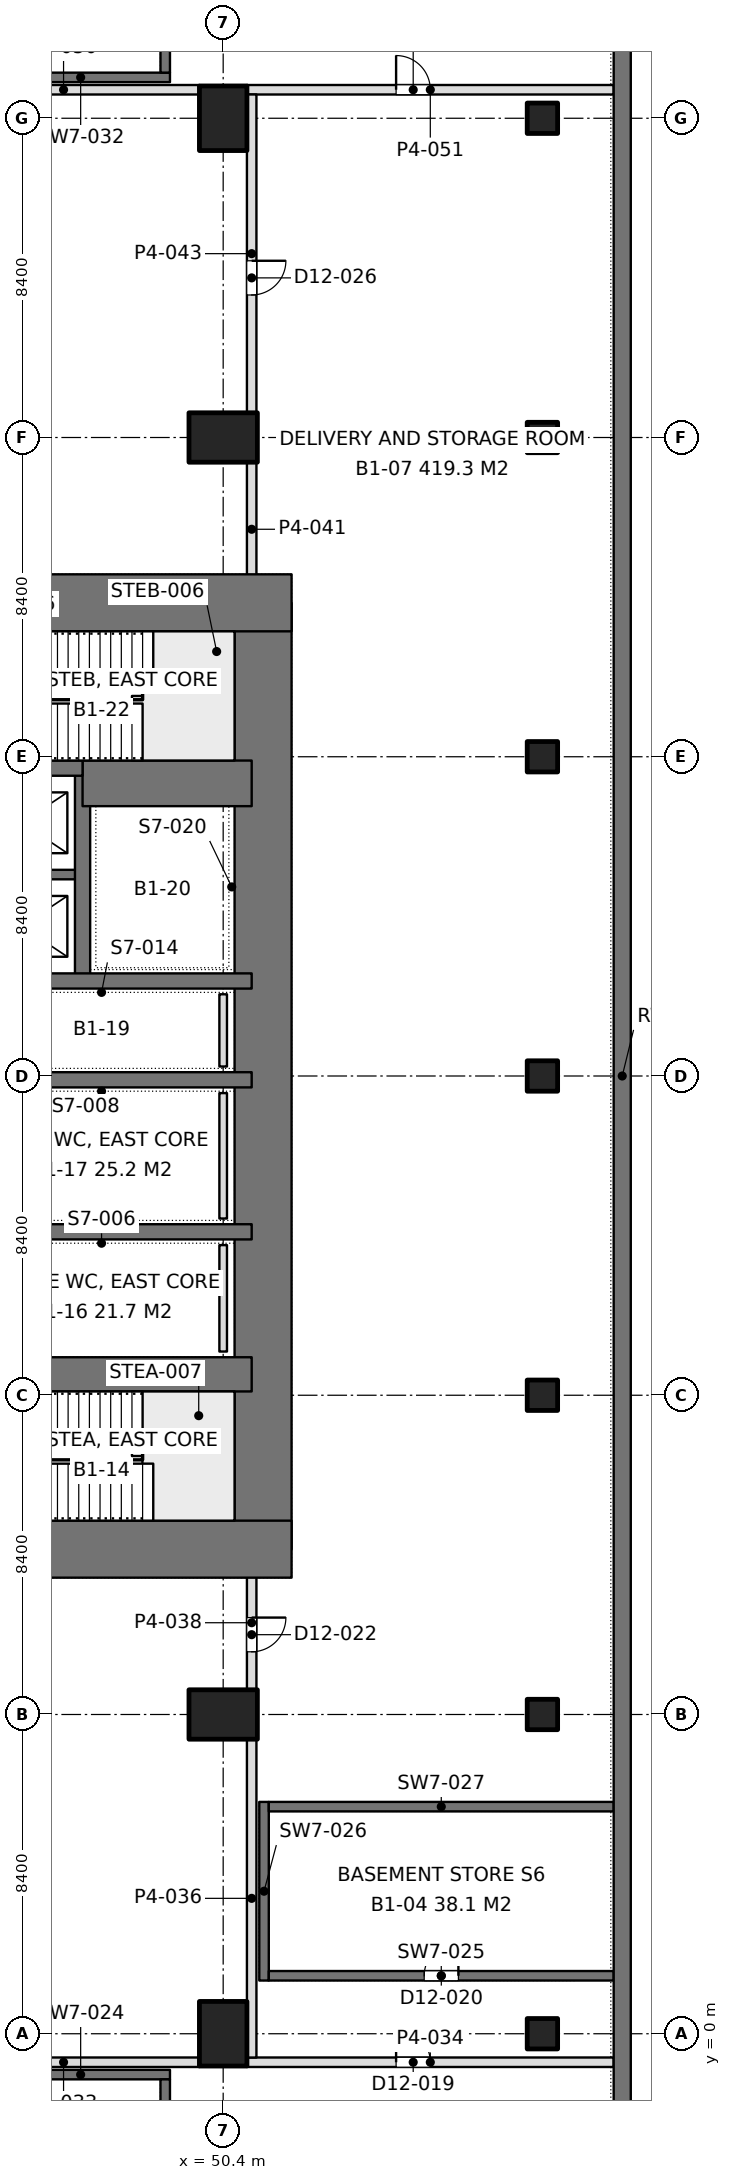
"""IFC4 building model, lengths in metres.
Left out: names, types, materials, properties, quantities, classifications, styles, units other than length and angle.
Written with IfcOpenShell. Run it as: python <this file> out.ifc"""

import sys

from ifc_helpers import new_model, si_unit, direction, frame, frame_2d, origin, origin_2d, place, context, subcontext, project, spatial, rectangle, extrude, element, fill, save


model = new_model("IFC4")
c1 = context("Model", 3, precision=1e-05, world=origin(), true_north=direction((0.0, 1.0)))
c2 = subcontext(c1, "Body", "Model", "MODEL_VIEW")
j1 = project(units=[si_unit("LENGTHUNIT", "METRE"), si_unit("PLANEANGLEUNIT", "RADIAN")], contexts=[c1])
p1 = place(None, origin())
s1 = spatial("IfcSite", under=j1, at=p1, CompositionType="ELEMENT")
p2 = place(p1, origin())
s2 = spatial("IfcBuilding", under=s1, at=p2, CompositionType="ELEMENT")
p3 = place(p2, frame((0.0, 0.0, -4.2)))
s3 = spatial("IfcBuildingStorey", under=s2, at=p3, CompositionType="ELEMENT", Elevation=-4.2)
p4 = place(p3, frame((60.9, -10.5, 0.0), z_axis=(0.0, 0.0, 1.0), x_axis=(0.0, 1.0, 0.0)))
e1 = element("IfcWall", 1, at=p4, inside=s3, PredefinedType="SOLIDWALL", context=c2, shape_type="SweptSolid", body=[
    extrude(rectangle(XDim=71.4, YDim=0.45, at=frame_2d((35.7, 0.0))), origin(), (0.0, 0.0, 1.0), 4.2),
])
p5 = place(p3, frame((50.4, 0.0, 0.0), z_axis=(0.0, 0.0, 1.0), x_axis=(1.0, 0.0, 0.0)))
e2 = element("IfcColumn", 2, at=p5, inside=s3, PredefinedType="COLUMN", context=c2, shape_type="SweptSolid", body=[
    extrude(rectangle(XDim=1.25, YDim=1.7, at=origin_2d()), origin(), (0.0, 0.0, 1.0), 4.2),
])
for number, where, z_axis, x_axis in (
    (3, (50.4, 8.4, 0.0), (0.0, 0.0, 1.0), (0.0, 1.0, 0.0)),
    (4, (50.4, 42.0, 0.0), (0.0, 0.0, 1.0), (0.0, 1.0, 0.0)),
):
    element("IfcColumn", number, at=place(p3, frame(where, z_axis=z_axis, x_axis=x_axis)), inside=s3, PredefinedType="COLUMN", context=c2, shape_type="SweptSolid", body=[
        extrude(rectangle(XDim=1.3, YDim=1.8, at=origin_2d()), origin(), (0.0, 0.0, 1.0), 4.2),
    ])
p6 = place(p3, frame((50.4, 50.4, 0.0), z_axis=(0.0, 0.0, 1.0), x_axis=(1.0, 0.0, 0.0)))
e5 = element("IfcColumn", 5, at=p6, inside=s3, PredefinedType="COLUMN", context=c2, shape_type="SweptSolid", body=[
    extrude(rectangle(XDim=1.25, YDim=1.7, at=origin_2d()), origin(), (0.0, 0.0, 1.0), 4.2),
])
for number, where, z_axis, x_axis in (
    (6, (58.8, 0.0, 0.0), (0.0, 0.0, 1.0), (1.0, 0.0, 0.0)),
    (7, (58.8, 8.4, 0.0), (0.0, 0.0, 1.0), (1.0, 0.0, 0.0)),
    (8, (58.8, 16.8, 0.0), (0.0, 0.0, 1.0), (1.0, 0.0, 0.0)),
    (9, (58.8, 25.2, 0.0), (0.0, 0.0, 1.0), (1.0, 0.0, 0.0)),
    (10, (58.8, 33.6, 0.0), (0.0, 0.0, 1.0), (1.0, 0.0, 0.0)),
    (11, (58.8, 42.0, 0.0), (0.0, 0.0, 1.0), (1.0, 0.0, 0.0)),
    (12, (58.8, 50.4, 0.0), (0.0, 0.0, 1.0), (1.0, 0.0, 0.0)),
):
    element("IfcColumn", number, at=place(p3, frame(where, z_axis=z_axis, x_axis=x_axis)), inside=s3, PredefinedType="COLUMN", context=c2, shape_type="SweptSolid", body=[
        extrude(rectangle(XDim=0.8, YDim=0.8, at=origin_2d()), origin(), (0.0, 0.0, 1.0), 4.2),
    ])
p7 = place(p3, frame((33.0, 12.75, 0.0), z_axis=(0.0, 0.0, 1.0), x_axis=(1.0, 0.0, 0.0)))
e13 = element("IfcWall", 13, at=p7, inside=s3, PredefinedType="SHEAR", context=c2, shape_type="SweptSolid", body=[
    extrude(rectangle(XDim=19.2, YDim=1.5, at=frame_2d((9.6, 0.0))), origin(), (0.0, 0.0, 1.0), 4.2),
])
p8 = place(p7, frame((7.85, 0.0, 0.0)))
e14 = element("IfcOpeningElement", 14, at=p8, cuts=e13, PredefinedType="OPENING", context=c2, shape_type="SweptSolid", body=[
    extrude(rectangle(XDim=1.8, YDim=2.4, at=frame_2d((0.9, 1.2))), frame((0.0, 0.76, 0.0), z_axis=(0.0, -1.0, 0.0), x_axis=(1.0, 0.0, 0.0)), (0.0, 0.0, 1.0), 1.52),
])
p9 = place(p3, frame((33.0, 37.65, 0.0), z_axis=(0.0, 0.0, 1.0), x_axis=(1.0, 0.0, 0.0)))
e15 = element("IfcWall", 15, at=p9, inside=s3, PredefinedType="SHEAR", context=c2, shape_type="SweptSolid", body=[
    extrude(rectangle(XDim=19.2, YDim=1.5, at=frame_2d((9.6, 0.0))), origin(), (0.0, 0.0, 1.0), 4.2),
])
p10 = place(p9, frame((7.85, 0.0, 0.0)))
e16 = element("IfcOpeningElement", 16, at=p10, cuts=e15, PredefinedType="OPENING", context=c2, shape_type="SweptSolid", body=[
    extrude(rectangle(XDim=1.8, YDim=2.4, at=frame_2d((0.9, 1.2))), frame((0.0, 0.76, 0.0), z_axis=(0.0, -1.0, 0.0), x_axis=(1.0, 0.0, 0.0)), (0.0, 0.0, 1.0), 1.52),
])
p11 = place(p3, frame((51.45, 12.75, 0.0), z_axis=(0.0, 0.0, 1.0), x_axis=(0.0, 1.0, 0.0)))
e17 = element("IfcWall", 17, at=p11, inside=s3, PredefinedType="SHEAR", context=c2, shape_type="SweptSolid", body=[
    extrude(rectangle(XDim=24.9, YDim=1.5, at=frame_2d((12.45, 0.0))), origin(), (0.0, 0.0, 1.0), 4.2),
])
p12 = place(p3, frame((51.15, 17.35, 0.0), z_axis=(0.0, 0.0, 1.0), x_axis=(-1.0, 0.0, 0.0)))
e18 = element("IfcWall", 18, at=p12, inside=s3, PredefinedType="SHEAR", context=c2, shape_type="SweptSolid", body=[
    extrude(rectangle(XDim=7.65, YDim=0.9, at=frame_2d((3.825, 0.0))), origin(), (0.0, 0.0, 1.0), 4.2),
])
for number, where, z_axis, x_axis in (
    (19, (51.15, 21.1, 0.0), (0.0, 0.0, 1.0), (-1.0, 0.0, 0.0)),
    (20, (51.15, 25.1, 0.0), (0.0, 0.0, 1.0), (-1.0, 0.0, 0.0)),
    (21, (51.15, 27.7, 0.0), (0.0, 0.0, 1.0), (-1.0, 0.0, 0.0)),
):
    element("IfcWall", number, at=place(p3, frame(where, z_axis=z_axis, x_axis=x_axis)), inside=s3, PredefinedType="SHEAR", context=c2, shape_type="SweptSolid", body=[
        extrude(rectangle(XDim=7.65, YDim=0.4, at=frame_2d((3.825, 0.0))), origin(), (0.0, 0.0, 1.0), 4.2),
    ])
p13 = place(p3, frame((51.15, 32.9, 0.0), z_axis=(0.0, 0.0, 1.0), x_axis=(-1.0, 0.0, 0.0)))
e22 = element("IfcWall", 22, at=p13, inside=s3, PredefinedType="SHEAR", context=c2, shape_type="SweptSolid", body=[
    extrude(rectangle(XDim=4.45, YDim=1.2, at=frame_2d((2.225, 0.0))), origin(), (0.0, 0.0, 1.0), 4.2),
])
p14 = place(p3, frame((46.7, 33.3, 0.0), z_axis=(0.0, 0.0, 1.0), x_axis=(-1.0, 0.0, 0.0)))
e23 = element("IfcWall", 23, at=p14, inside=s3, PredefinedType="SHEAR", context=c2, shape_type="SweptSolid", body=[
    extrude(rectangle(XDim=3.2, YDim=0.4, at=frame_2d((1.6, 0.0))), origin(), (0.0, 0.0, 1.0), 4.2),
])
p15 = place(p3, frame((46.7, 27.7, 0.0), z_axis=(0.0, 0.0, 1.0), x_axis=(0.0, 1.0, 0.0)))
e24 = element("IfcWall", 24, at=p15, inside=s3, PredefinedType="SHEAR", context=c2, shape_type="SweptSolid", body=[
    extrude(rectangle(XDim=5.6, YDim=0.4, at=frame_2d((2.8, 0.0))), origin(), (0.0, 0.0, 1.0), 4.2),
])
p16 = place(p3, frame((46.7, 30.5, 0.0), z_axis=(0.0, 0.0, 1.0), x_axis=(-1.0, 0.0, 0.0)))
e25 = element("IfcWall", 25, at=p16, inside=s3, PredefinedType="SHEAR", context=c2, shape_type="SweptSolid", body=[
    extrude(rectangle(XDim=3.2, YDim=0.25, at=frame_2d((1.6, 0.0))), origin(), (0.0, 0.0, 1.0), 4.2),
])
p17 = place(p3, frame((42.624, -0.75, 0.0), z_axis=(0.0, 0.0, 1.0), x_axis=(1.0, 0.0, 0.0)))
e26 = element("IfcWall", 26, at=p17, inside=s3, PredefinedType="PARTITIONING", context=c2, shape_type="SweptSolid", body=[
    extrude(rectangle(XDim=7.152, YDim=0.25, at=frame_2d((3.576, 0.0))), origin(), (0.0, 0.0, 1.0), 3.8),
])
p18 = place(p3, frame((51.024, -0.75, 0.0), z_axis=(0.0, 0.0, 1.0), x_axis=(1.0, 0.0, 0.0)))
e27 = element("IfcWall", 27, at=p18, inside=s3, PredefinedType="PARTITIONING", context=c2, shape_type="SweptSolid", body=[
    extrude(rectangle(XDim=9.652, YDim=0.25, at=frame_2d((4.826, 0.0))), origin(), (0.0, 0.0, 1.0), 3.8),
])
p19 = place(p18, frame((3.926, 0.0, 0.0)))
e28 = element("IfcOpeningElement", 28, at=p19, cuts=e27, PredefinedType="OPENING", context=c2, shape_type="SweptSolid", body=[
    extrude(rectangle(XDim=0.9, YDim=2.2, at=frame_2d((0.45, 1.1))), frame((0.0, 0.135, 0.0), z_axis=(0.0, -1.0, 0.0), x_axis=(1.0, 0.0, 0.0)), (0.0, 0.0, 1.0), 0.27),
])
p20 = place(p3, frame((42.624, 51.15, 0.0), z_axis=(0.0, 0.0, 1.0), x_axis=(1.0, 0.0, 0.0)))
e29 = element("IfcWall", 29, at=p20, inside=s3, PredefinedType="PARTITIONING", context=c2, shape_type="SweptSolid", body=[
    extrude(rectangle(XDim=7.152, YDim=0.25, at=frame_2d((3.576, 0.0))), origin(), (0.0, 0.0, 1.0), 3.8),
])
p21 = place(p3, frame((51.024, 51.15, 0.0), z_axis=(0.0, 0.0, 1.0), x_axis=(1.0, 0.0, 0.0)))
e30 = element("IfcWall", 30, at=p21, inside=s3, PredefinedType="PARTITIONING", context=c2, shape_type="SweptSolid", body=[
    extrude(rectangle(XDim=9.652, YDim=0.25, at=frame_2d((4.826, 0.0))), origin(), (0.0, 0.0, 1.0), 3.8),
])
p22 = place(p21, frame((3.926, 0.0, 0.0)))
e31 = element("IfcOpeningElement", 31, at=p22, cuts=e30, PredefinedType="OPENING", context=c2, shape_type="SweptSolid", body=[
    extrude(rectangle(XDim=0.9, YDim=2.2, at=frame_2d((0.45, 1.1))), frame((0.0, 0.135, 0.0), z_axis=(0.0, -1.0, 0.0), x_axis=(1.0, 0.0, 0.0)), (0.0, 0.0, 1.0), 0.27),
])
p23 = place(p3, frame((51.15, -0.626, 0.0), z_axis=(0.0, 0.0, 1.0), x_axis=(0.0, 1.0, 0.0)))
e32 = element("IfcWall", 32, at=p23, inside=s3, PredefinedType="PARTITIONING", context=c2, shape_type="SweptSolid", body=[
    extrude(rectangle(XDim=8.377, YDim=0.25, at=frame_2d((4.188, 0.0))), origin(), (0.0, 0.0, 1.0), 3.8),
])
p24 = place(p3, frame((51.15, 9.049, 0.0), z_axis=(0.0, 0.0, 1.0), x_axis=(0.0, 1.0, 0.0)))
e33 = element("IfcWall", 33, at=p24, inside=s3, PredefinedType="PARTITIONING", context=c2, shape_type="SweptSolid", body=[
    extrude(rectangle(XDim=3.531, YDim=0.25, at=frame_2d((1.766, 0.0))), origin(), (0.0, 0.0, 1.0), 3.8),
])
p25 = place(p24, frame((1.001, 0.0, 0.0)))
e34 = element("IfcOpeningElement", 34, at=p25, cuts=e33, PredefinedType="OPENING", context=c2, shape_type="SweptSolid", body=[
    extrude(rectangle(XDim=0.9, YDim=2.2, at=frame_2d((0.45, 1.1))), frame((0.0, 0.135, 0.0), z_axis=(0.0, -1.0, 0.0), x_axis=(1.0, 0.0, 0.0)), (0.0, 0.0, 1.0), 0.27),
])
p26 = place(p3, frame((51.15, 37.82, 0.0), z_axis=(0.0, 0.0, 1.0), x_axis=(0.0, 1.0, 0.0)))
e35 = element("IfcWall", 35, at=p26, inside=s3, PredefinedType="PARTITIONING", context=c2, shape_type="SweptSolid", body=[
    extrude(rectangle(XDim=3.531, YDim=0.25, at=frame_2d((1.766, 0.0))), origin(), (0.0, 0.0, 1.0), 3.8),
])
p27 = place(p3, frame((51.15, 42.649, 0.0), z_axis=(0.0, 0.0, 1.0), x_axis=(0.0, 1.0, 0.0)))
e36 = element("IfcWall", 36, at=p27, inside=s3, PredefinedType="PARTITIONING", context=c2, shape_type="SweptSolid", body=[
    extrude(rectangle(XDim=8.377, YDim=0.25, at=frame_2d((4.188, 0.0))), origin(), (0.0, 0.0, 1.0), 3.8),
])
p28 = place(p27, frame((3.101, 0.0, 0.0)))
e37 = element("IfcOpeningElement", 37, at=p28, cuts=e36, PredefinedType="OPENING", context=c2, shape_type="SweptSolid", body=[
    extrude(rectangle(XDim=0.9, YDim=2.2, at=frame_2d((0.45, 1.1))), frame((0.0, 0.135, 0.0), z_axis=(0.0, -1.0, 0.0), x_axis=(1.0, 0.0, 0.0)), (0.0, 0.0, 1.0), 0.27),
])
p29 = place(p3, frame((50.4, 17.95, 0.0), z_axis=(0.0, 0.0, 1.0), x_axis=(0.0, 1.0, 0.0)))
e38 = element("IfcWall", 38, at=p29, inside=s3, PredefinedType="PLUMBINGWALL", context=c2, shape_type="SweptSolid", body=[
    extrude(rectangle(XDim=2.8, YDim=0.2, at=frame_2d((1.4, 0.0))), origin(), (0.0, 0.0, 1.0), 1.2),
])
p30 = place(p3, frame((50.4, 21.45, 0.0), z_axis=(0.0, 0.0, 1.0), x_axis=(0.0, 1.0, 0.0)))
e39 = element("IfcWall", 39, at=p30, inside=s3, PredefinedType="PLUMBINGWALL", context=c2, shape_type="SweptSolid", body=[
    extrude(rectangle(XDim=3.3, YDim=0.2, at=frame_2d((1.65, 0.0))), origin(), (0.0, 0.0, 1.0), 1.2),
])
p31 = place(p3, frame((50.4, 25.45, 0.0), z_axis=(0.0, 0.0, 1.0), x_axis=(0.0, 1.0, 0.0)))
e40 = element("IfcWall", 40, at=p31, inside=s3, PredefinedType="PLUMBINGWALL", context=c2, shape_type="SweptSolid", body=[
    extrude(rectangle(XDim=1.9, YDim=0.2, at=frame_2d((0.95, 0.0))), origin(), (0.0, 0.0, 1.0), 1.2),
])
p32 = place(p3, frame((48.875, -10.277, 0.0), z_axis=(0.0, 0.0, 1.0), x_axis=(0.0, 1.0, 0.0)))
e41 = element("IfcWall", 41, at=p32, inside=s3, PredefinedType="SOLIDWALL", context=c2, shape_type="SweptSolid", body=[
    extrude(rectangle(XDim=9.077, YDim=0.25, at=frame_2d((4.539, 0.0))), origin(), (0.0, 0.0, 1.0), 4.2),
])
p33 = place(p3, frame((44.3, -1.075, 0.0), z_axis=(0.0, 0.0, 1.0), x_axis=(1.0, 0.0, 0.0)))
e42 = element("IfcWall", 42, at=p33, inside=s3, PredefinedType="SOLIDWALL", context=c2, shape_type="SweptSolid", body=[
    extrude(rectangle(XDim=4.7, YDim=0.25, at=frame_2d((2.35, 0.0))), origin(), (0.0, 0.0, 1.0), 4.2),
])
p34 = place(p3, frame((48.875, 60.677, 0.0), z_axis=(0.0, 0.0, 1.0), x_axis=(0.0, -1.0, 0.0)))
e43 = element("IfcWall", 43, at=p34, inside=s3, PredefinedType="SOLIDWALL", context=c2, shape_type="SweptSolid", body=[
    extrude(rectangle(XDim=9.077, YDim=0.25, at=frame_2d((4.539, 0.0))), origin(), (0.0, 0.0, 1.0), 4.2),
])
p35 = place(p3, frame((44.3, 51.475, 0.0), z_axis=(0.0, 0.0, 1.0), x_axis=(1.0, 0.0, 0.0)))
e44 = element("IfcWall", 44, at=p35, inside=s3, PredefinedType="SOLIDWALL", context=c2, shape_type="SweptSolid", body=[
    extrude(rectangle(XDim=4.7, YDim=0.25, at=frame_2d((2.35, 0.0))), origin(), (0.0, 0.0, 1.0), 4.2),
])
p36 = place(p3, frame((60.677, 1.525, 0.0), z_axis=(0.0, 0.0, 1.0), x_axis=(-1.0, 0.0, 0.0)))
e45 = element("IfcWall", 45, at=p36, inside=s3, PredefinedType="SOLIDWALL", context=c2, shape_type="SweptSolid", body=[
    extrude(rectangle(XDim=9.077, YDim=0.25, at=frame_2d((4.539, 0.0))), origin(), (0.0, 0.0, 1.0), 4.2),
])
p37 = place(p36, frame((4.087, 0.0, 0.0)))
e46 = element("IfcOpeningElement", 46, at=p37, cuts=e45, PredefinedType="OPENING", context=c2, shape_type="SweptSolid", body=[
    extrude(rectangle(XDim=0.9, YDim=2.2, at=frame_2d((0.45, 1.1))), frame((0.0, 0.135, 0.0), z_axis=(0.0, -1.0, 0.0), x_axis=(1.0, 0.0, 0.0)), (0.0, 0.0, 1.0), 0.27),
])
p38 = place(p3, frame((60.677, 5.975, 0.0), z_axis=(0.0, 0.0, 1.0), x_axis=(-1.0, 0.0, 0.0)))
e47 = element("IfcWall", 47, at=p38, inside=s3, PredefinedType="SOLIDWALL", context=c2, shape_type="SweptSolid", body=[
    extrude(rectangle(XDim=9.077, YDim=0.25, at=frame_2d((4.539, 0.0))), origin(), (0.0, 0.0, 1.0), 4.2),
])
p39 = place(p3, frame((51.475, 1.4, 0.0), z_axis=(0.0, 0.0, 1.0), x_axis=(0.0, 1.0, 0.0)))
e48 = element("IfcWall", 48, at=p39, inside=s3, PredefinedType="SOLIDWALL", context=c2, shape_type="SweptSolid", body=[
    extrude(rectangle(XDim=4.7, YDim=0.25, at=frame_2d((2.35, 0.0))), origin(), (0.0, 0.0, 1.0), 4.2),
])
p40 = place(p19, origin())
e49 = element("IfcDoor", 49, at=p40, inside=s3, OperationType="SINGLE_SWING_LEFT", PredefinedType="DOOR", context=c2, shape_type="SweptSolid", body=[
    extrude(rectangle(XDim=0.9, YDim=2.2, at=frame_2d((0.45, 1.1))), frame((0.0, 0.025, 0.0), z_axis=(0.0, -1.0, 0.0), x_axis=(1.0, 0.0, 0.0)), (0.0, 0.0, 1.0), 0.05),
])
fill(e28, e49)
p41 = place(p22, origin())
e50 = element("IfcDoor", 50, at=p41, inside=s3, OperationType="SINGLE_SWING_LEFT", PredefinedType="DOOR", context=c2, shape_type="SweptSolid", body=[
    extrude(rectangle(XDim=0.9, YDim=2.2, at=frame_2d((0.45, 1.1))), frame((0.0, 0.025, 0.0), z_axis=(0.0, -1.0, 0.0), x_axis=(1.0, 0.0, 0.0)), (0.0, 0.0, 1.0), 0.05),
])
fill(e31, e50)
p42 = place(p25, frame((0.9, 0.0, 0.0), z_axis=(0.0, 0.0, 1.0), x_axis=(-1.0, 0.0, 0.0)))
e51 = element("IfcDoor", 51, at=p42, inside=s3, OperationType="SINGLE_SWING_LEFT", PredefinedType="DOOR", context=c2, shape_type="SweptSolid", body=[
    extrude(rectangle(XDim=0.9, YDim=2.2, at=frame_2d((0.45, 1.1))), frame((0.0, 0.025, 0.0), z_axis=(0.0, -1.0, 0.0), x_axis=(1.0, 0.0, 0.0)), (0.0, 0.0, 1.0), 0.05),
])
fill(e34, e51)
p43 = place(p28, frame((0.9, 0.0, 0.0), z_axis=(0.0, 0.0, 1.0), x_axis=(-1.0, 0.0, 0.0)))
e52 = element("IfcDoor", 52, at=p43, inside=s3, OperationType="SINGLE_SWING_LEFT", PredefinedType="DOOR", context=c2, shape_type="SweptSolid", body=[
    extrude(rectangle(XDim=0.9, YDim=2.2, at=frame_2d((0.45, 1.1))), frame((0.0, 0.025, 0.0), z_axis=(0.0, -1.0, 0.0), x_axis=(1.0, 0.0, 0.0)), (0.0, 0.0, 1.0), 0.05),
])
fill(e37, e52)
p44 = place(p37, frame((0.9, 0.0, 0.0), z_axis=(0.0, 0.0, 1.0), x_axis=(-1.0, 0.0, 0.0)))
e53 = element("IfcDoor", 53, at=p44, inside=s3, OperationType="SINGLE_SWING_RIGHT", PredefinedType="DOOR", context=c2, shape_type="SweptSolid", body=[
    extrude(rectangle(XDim=0.9, YDim=2.2, at=frame_2d((0.45, 1.1))), frame((0.0, 0.025, 0.0), z_axis=(0.0, -1.0, 0.0), x_axis=(1.0, 0.0, 0.0)), (0.0, 0.0, 1.0), 0.05),
])
fill(e46, e53)
save(model, sys.argv[1])
